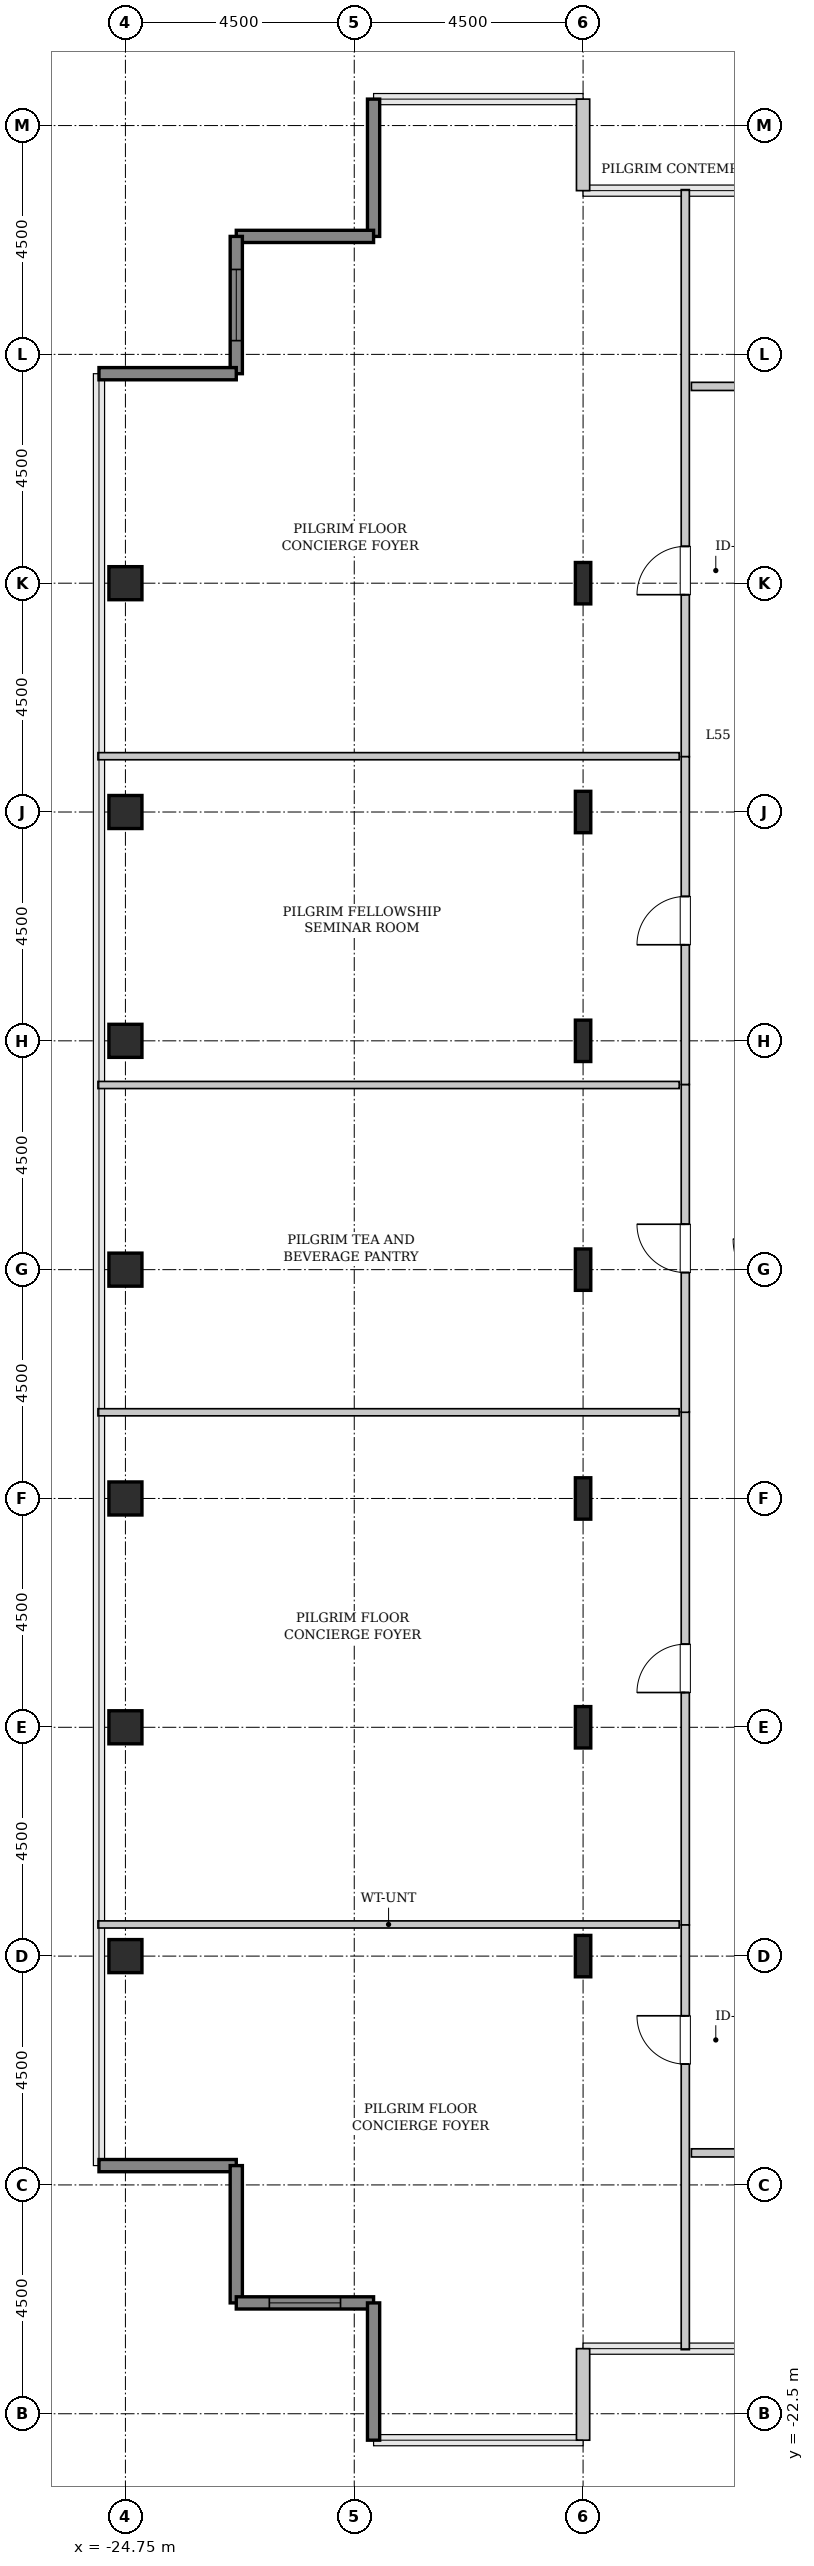
"""IFC4 building model, lengths in metres.
Left out: names, types, materials, properties, quantities, classifications, styles, units other than length and angle.
Written with IfcOpenShell. Run it as: python <this file> out.ifc"""

import sys

from ifc_helpers import new_model, si_unit, direction, frame, frame_2d, origin, origin_2d, place, context, subcontext, project, spatial, rectangle, hollow_rectangle, i_section, extrude, source, transform, mapped, element, fill, save


model = new_model("IFC4")
c1 = context("Model", 3, precision=1e-05, world=origin(), true_north=direction((0.0, 1.0)))
c2 = subcontext(c1, "Body", "Model", "MODEL_VIEW")
j1 = project(units=[si_unit("LENGTHUNIT", "METRE"), si_unit("PLANEANGLEUNIT", "RADIAN")], contexts=[c1])
p1 = place(None, origin())
s1 = spatial("IfcSite", under=j1, at=p1, CompositionType="ELEMENT")
p2 = place(p1, origin())
s2 = spatial("IfcBuilding", under=s1, at=p2, CompositionType="ELEMENT")
p3 = place(p2, frame((0.0, 0.0, 221.8)))
s3 = spatial("IfcBuildingStorey", under=s2, at=p3, CompositionType="ELEMENT", Elevation=221.8)
m1 = source(origin(), c2, "Body", "SweptSolid", [
    extrude(hollow_rectangle(XDim=0.65, YDim=0.65, WallThickness=0.032, InnerFilletRadius=0.032, OuterFilletRadius=0.064, at=origin_2d()), origin(), (0.0, 0.0, 1.0), 3.8),
])
for number, where, z_axis, x_axis in (
    (1, (-24.75, -13.5, 0.0), (0.0, 0.0, 1.0), (1.0, 0.0, 0.0)),
    (2, (-24.75, -9.0, 0.0), (0.0, 0.0, 1.0), (1.0, 0.0, 0.0)),
    (3, (-24.75, -4.5, 0.0), (0.0, 0.0, 1.0), (1.0, 0.0, 0.0)),
    (4, (-24.75, 0.0, 0.0), (0.0, 0.0, 1.0), (1.0, 0.0, 0.0)),
    (5, (-24.75, 4.5, 0.0), (0.0, 0.0, 1.0), (1.0, 0.0, 0.0)),
    (6, (-24.75, 9.0, 0.0), (0.0, 0.0, 1.0), (1.0, 0.0, 0.0)),
    (7, (-24.75, 13.5, 0.0), (0.0, 0.0, 1.0), (1.0, 0.0, 0.0)),
):
    element("IfcColumn", number, at=place(p3, frame(where, z_axis=z_axis, x_axis=x_axis)), inside=s3, PredefinedType="COLUMN", context=c2, shape_type="MappedRepresentation", body=[
        mapped(m1, transform((0.0, 0.0, 0.0), x_axis=(1.0, 0.0, 0.0), y_axis=(0.0, 1.0, 0.0), z_axis=(0.0, 0.0, 1.0), scale=1.0)),
    ])
m2 = source(origin(), c2, "Body", "SweptSolid", [
    extrude(i_section(OverallWidth=0.303, OverallDepth=0.814, WebThickness=0.021, FlangeThickness=0.04, FilletRadius=0.03, at=origin_2d()), origin(), (0.0, 0.0, 1.0), 3.8),
])
for number, where, z_axis, x_axis in (
    (8, (-15.75, -13.5, 0.0), (0.0, 0.0, 1.0), (1.0, 0.0, 0.0)),
    (9, (-15.75, -9.0, 0.0), (0.0, 0.0, 1.0), (1.0, 0.0, 0.0)),
    (10, (-15.75, -4.5, 0.0), (0.0, 0.0, 1.0), (1.0, 0.0, 0.0)),
    (11, (-15.75, 0.0, 0.0), (0.0, 0.0, 1.0), (1.0, 0.0, 0.0)),
    (12, (-15.75, 4.5, 0.0), (0.0, 0.0, 1.0), (1.0, 0.0, 0.0)),
    (13, (-15.75, 9.0, 0.0), (0.0, 0.0, 1.0), (1.0, 0.0, 0.0)),
    (14, (-15.75, 13.5, 0.0), (0.0, 0.0, 1.0), (1.0, 0.0, 0.0)),
):
    element("IfcColumn", number, at=place(p3, frame(where, z_axis=z_axis, x_axis=x_axis)), inside=s3, PredefinedType="COLUMN", context=c2, shape_type="MappedRepresentation", body=[
        mapped(m2, transform((0.0, 0.0, 0.0), x_axis=(1.0, 0.0, 0.0), y_axis=(0.0, 1.0, 0.0), z_axis=(0.0, 0.0, 1.0), scale=1.0)),
    ])
m3 = source(origin(), c2, "Body", "SweptSolid", [
    extrude(rectangle(XDim=1.8, YDim=0.26, at=frame_2d((0.9, 0.0))), origin(), (0.0, 0.0, 1.0), 3.55),
])
p4 = place(p3, frame((-15.75, 21.22, 0.0), z_axis=(0.0, 0.0, 1.0), x_axis=(0.0, 1.0, 0.0)))
e15 = element("IfcWall", 15, at=p4, inside=s3, PredefinedType="SOLIDWALL", context=c2, shape_type="MappedRepresentation", body=[
    mapped(m3, transform((0.0, 0.0, 0.0), x_axis=(1.0, 0.0, 0.0), y_axis=(0.0, 1.0, 0.0), z_axis=(0.0, 0.0, 1.0), scale=1.0)),
])
m4 = source(origin(), c2, "Body", "SweptSolid", [
    extrude(rectangle(XDim=2.7, YDim=0.24, at=frame_2d((1.35, 0.0))), origin(), (0.0, 0.0, 1.0), 3.55),
])
for number, where, z_axis, x_axis in (
    (16, (-19.87, 23.02, 0.0), (0.0, 0.0, 1.0), (0.0, -1.0, 0.0)),
    (17, (-19.87, 20.32, 0.0), (0.0, 0.0, 1.0), (-1.0, 0.0, 0.0)),
):
    element("IfcWall", number, at=place(p3, frame(where, z_axis=z_axis, x_axis=x_axis)), inside=s3, PredefinedType="SHEAR", context=c2, shape_type="MappedRepresentation", body=[
        mapped(m4, transform((0.0, 0.0, 0.0), x_axis=(1.0, 0.0, 0.0), y_axis=(0.0, 1.0, 0.0), z_axis=(0.0, 0.0, 1.0), scale=1.0)),
    ])
p5 = place(p3, frame((-22.57, 20.32, 0.0), z_axis=(0.0, 0.0, 1.0), x_axis=(0.0, -1.0, 0.0)))
e18 = element("IfcWall", 18, at=p5, inside=s3, PredefinedType="SHEAR", context=c2, shape_type="MappedRepresentation", body=[
    mapped(m4, transform((0.0, 0.0, 0.0), x_axis=(1.0, 0.0, 0.0), y_axis=(0.0, 1.0, 0.0), z_axis=(0.0, 0.0, 1.0), scale=1.0)),
])
p6 = place(p5, frame((0.65, 0.0, 0.85)))
e19 = element("IfcOpeningElement", 19, at=p6, cuts=e18, PredefinedType="OPENING", context=c2, shape_type="SweptSolid", body=[
    extrude(rectangle(XDim=1.4, YDim=1.8, at=frame_2d((0.7, 0.9))), frame((0.0, 0.13, 0.0), z_axis=(0.0, -1.0, 0.0), x_axis=(1.0, 0.0, 0.0)), (0.0, 0.0, 1.0), 0.26),
])
for number, where, z_axis, x_axis in (
    (20, (-22.57, 17.62, 0.0), (0.0, 0.0, 1.0), (-1.0, 0.0, 0.0)),
    (21, (-25.27, -17.62, 0.0), (0.0, 0.0, 1.0), (1.0, 0.0, 0.0)),
    (22, (-22.57, -17.62, 0.0), (0.0, 0.0, 1.0), (0.0, -1.0, 0.0)),
):
    element("IfcWall", number, at=place(p3, frame(where, z_axis=z_axis, x_axis=x_axis)), inside=s3, PredefinedType="SHEAR", context=c2, shape_type="MappedRepresentation", body=[
        mapped(m4, transform((0.0, 0.0, 0.0), x_axis=(1.0, 0.0, 0.0), y_axis=(0.0, 1.0, 0.0), z_axis=(0.0, 0.0, 1.0), scale=1.0)),
    ])
p7 = place(p3, frame((-22.57, -20.32, 0.0), z_axis=(0.0, 0.0, 1.0), x_axis=(1.0, 0.0, 0.0)))
e23 = element("IfcWall", 23, at=p7, inside=s3, PredefinedType="SHEAR", context=c2, shape_type="MappedRepresentation", body=[
    mapped(m4, transform((0.0, 0.0, 0.0), x_axis=(1.0, 0.0, 0.0), y_axis=(0.0, 1.0, 0.0), z_axis=(0.0, 0.0, 1.0), scale=1.0)),
])
p8 = place(p7, frame((0.65, 0.0, 0.85)))
e24 = element("IfcOpeningElement", 24, at=p8, cuts=e23, PredefinedType="OPENING", context=c2, shape_type="SweptSolid", body=[
    extrude(rectangle(XDim=1.4, YDim=1.8, at=frame_2d((0.7, 0.9))), frame((0.0, 0.13, 0.0), z_axis=(0.0, -1.0, 0.0), x_axis=(1.0, 0.0, 0.0)), (0.0, 0.0, 1.0), 0.26),
])
p9 = place(p3, frame((-19.87, -20.32, 0.0), z_axis=(0.0, 0.0, 1.0), x_axis=(0.0, -1.0, 0.0)))
e25 = element("IfcWall", 25, at=p9, inside=s3, PredefinedType="SHEAR", context=c2, shape_type="MappedRepresentation", body=[
    mapped(m4, transform((0.0, 0.0, 0.0), x_axis=(1.0, 0.0, 0.0), y_axis=(0.0, 1.0, 0.0), z_axis=(0.0, 0.0, 1.0), scale=1.0)),
])
p10 = place(p3, frame((-15.75, -23.02, 0.0), z_axis=(0.0, 0.0, 1.0), x_axis=(0.0, 1.0, 0.0)))
e26 = element("IfcWall", 26, at=p10, inside=s3, PredefinedType="SOLIDWALL", context=c2, shape_type="MappedRepresentation", body=[
    mapped(m3, transform((0.0, 0.0, 0.0), x_axis=(1.0, 0.0, 0.0), y_axis=(0.0, 1.0, 0.0), z_axis=(0.0, 0.0, 1.0), scale=1.0)),
])
m5 = source(origin(), c2, "Body", "SweptSolid", [
    extrude(rectangle(XDim=10.093, YDim=0.16, at=frame_2d((5.046, 0.0))), origin(), (0.0, 0.0, 1.0), 3.535),
])
p11 = place(p3, frame((-13.74, -12.887, 0.0), z_axis=(0.0, 0.0, 1.0), x_axis=(0.0, 1.0, 0.0)))
e27 = element("IfcWall", 27, at=p11, inside=s3, PredefinedType="PARTITIONING", context=c2, shape_type="MappedRepresentation", body=[
    mapped(m5, transform((0.0, 0.0, 0.0), x_axis=(1.0, 0.0, 0.0), y_axis=(0.0, 1.0, 0.0), z_axis=(0.0, 0.0, 1.0), scale=1.0)),
])
p12 = place(p11, frame((4.571, 0.0, 0.0)))
e28 = element("IfcOpeningElement", 28, at=p12, cuts=e27, PredefinedType="OPENING", context=c2, shape_type="SweptSolid", body=[
    extrude(rectangle(XDim=0.95, YDim=2.1, at=frame_2d((0.475, 1.05))), frame((0.0, 0.09, 0.0), z_axis=(0.0, -1.0, 0.0), x_axis=(1.0, 0.0, 0.0)), (0.0, 0.0, 1.0), 0.18),
])
m6 = source(origin(), c2, "Body", "SweptSolid", [
    extrude(rectangle(XDim=11.43, YDim=0.14, at=frame_2d((5.715, 0.0))), origin(), (0.0, 0.0, 1.0), 3.535),
])
for number, where, z_axis, x_axis in (
    (29, (-25.29, -12.877, 0.0), (0.0, 0.0, 1.0), (1.0, 0.0, 0.0)),
    (30, (-25.29, -2.805, 0.0), (0.0, 0.0, 1.0), (1.0, 0.0, 0.0)),
):
    element("IfcWall", number, at=place(p3, frame(where, z_axis=z_axis, x_axis=x_axis)), inside=s3, PredefinedType="PARTITIONING", context=c2, shape_type="MappedRepresentation", body=[
        mapped(m6, transform((0.0, 0.0, 0.0), x_axis=(1.0, 0.0, 0.0), y_axis=(0.0, 1.0, 0.0), z_axis=(0.0, 0.0, 1.0), scale=1.0)),
    ])
m7 = source(origin(), c2, "Body", "SweptSolid", [
    extrude(rectangle(XDim=8.353, YDim=0.16, at=frame_2d((4.176, 0.0))), origin(), (0.0, 0.0, 1.0), 3.535),
])
p13 = place(p3, frame((-13.74, -21.24, 0.0), z_axis=(0.0, 0.0, 1.0), x_axis=(0.0, 1.0, 0.0)))
e31 = element("IfcWall", 31, at=p13, inside=s3, PredefinedType="PARTITIONING", context=c2, shape_type="MappedRepresentation", body=[
    mapped(m7, transform((0.0, 0.0, 0.0), x_axis=(1.0, 0.0, 0.0), y_axis=(0.0, 1.0, 0.0), z_axis=(0.0, 0.0, 1.0), scale=1.0)),
])
p14 = place(p13, frame((5.616, 0.0, 0.0)))
e32 = element("IfcOpeningElement", 32, at=p14, cuts=e31, PredefinedType="OPENING", context=c2, shape_type="SweptSolid", body=[
    extrude(rectangle(XDim=0.95, YDim=2.1, at=frame_2d((0.475, 1.05))), frame((0.0, 0.09, 0.0), z_axis=(0.0, -1.0, 0.0), x_axis=(1.0, 0.0, 0.0)), (0.0, 0.0, 1.0), 0.18),
])
m8 = source(origin(), c2, "Body", "SweptSolid", [
    extrude(rectangle(XDim=11.153, YDim=0.16, at=frame_2d((5.576, 0.0))), origin(), (0.0, 0.0, 1.0), 3.535),
])
p15 = place(p3, frame((-13.74, 10.087, 0.0), z_axis=(0.0, 0.0, 1.0), x_axis=(0.0, 1.0, 0.0)))
e33 = element("IfcWall", 33, at=p15, inside=s3, PredefinedType="PARTITIONING", context=c2, shape_type="MappedRepresentation", body=[
    mapped(m8, transform((0.0, 0.0, 0.0), x_axis=(1.0, 0.0, 0.0), y_axis=(0.0, 1.0, 0.0), z_axis=(0.0, 0.0, 1.0), scale=1.0)),
])
p16 = place(p15, frame((3.186, 0.0, 0.0)))
e34 = element("IfcOpeningElement", 34, at=p16, cuts=e33, PredefinedType="OPENING", context=c2, shape_type="SweptSolid", body=[
    extrude(rectangle(XDim=0.95, YDim=2.1, at=frame_2d((0.475, 1.05))), frame((0.0, 0.09, 0.0), z_axis=(0.0, -1.0, 0.0), x_axis=(1.0, 0.0, 0.0)), (0.0, 0.0, 1.0), 0.18),
])
p17 = place(p3, frame((-25.29, 10.097, 0.0), z_axis=(0.0, 0.0, 1.0), x_axis=(1.0, 0.0, 0.0)))
e35 = element("IfcWall", 35, at=p17, inside=s3, PredefinedType="PARTITIONING", context=c2, shape_type="MappedRepresentation", body=[
    mapped(m6, transform((0.0, 0.0, 0.0), x_axis=(1.0, 0.0, 0.0), y_axis=(0.0, 1.0, 0.0), z_axis=(0.0, 0.0, 1.0), scale=1.0)),
])
m9 = source(origin(), c2, "Body", "SweptSolid", [
    extrude(rectangle(XDim=6.446, YDim=0.16, at=frame_2d((3.223, 0.0))), origin(), (0.0, 0.0, 1.0), 3.535),
])
p18 = place(p3, frame((-13.74, -2.805, 0.0), z_axis=(0.0, 0.0, 1.0), x_axis=(0.0, 1.0, 0.0)))
e36 = element("IfcWall", 36, at=p18, inside=s3, PredefinedType="PARTITIONING", context=c2, shape_type="MappedRepresentation", body=[
    mapped(m9, transform((0.0, 0.0, 0.0), x_axis=(1.0, 0.0, 0.0), y_axis=(0.0, 1.0, 0.0), z_axis=(0.0, 0.0, 1.0), scale=1.0)),
])
p19 = place(p18, frame((2.748, 0.0, 0.0)))
e37 = element("IfcOpeningElement", 37, at=p19, cuts=e36, PredefinedType="OPENING", context=c2, shape_type="SweptSolid", body=[
    extrude(rectangle(XDim=0.95, YDim=2.1, at=frame_2d((0.475, 1.05))), frame((0.0, 0.09, 0.0), z_axis=(0.0, -1.0, 0.0), x_axis=(1.0, 0.0, 0.0)), (0.0, 0.0, 1.0), 0.18),
])
p20 = place(p3, frame((-25.29, 3.631, 0.0), z_axis=(0.0, 0.0, 1.0), x_axis=(1.0, 0.0, 0.0)))
e38 = element("IfcWall", 38, at=p20, inside=s3, PredefinedType="PARTITIONING", context=c2, shape_type="MappedRepresentation", body=[
    mapped(m6, transform((0.0, 0.0, 0.0), x_axis=(1.0, 0.0, 0.0), y_axis=(0.0, 1.0, 0.0), z_axis=(0.0, 0.0, 1.0), scale=1.0)),
])
m10 = source(origin(), c2, "Body", "SweptSolid", [
    extrude(rectangle(XDim=6.446, YDim=0.16, at=frame_2d((3.223, 0.0))), origin(), (0.0, 0.0, 1.0), 3.535),
])
p21 = place(p3, frame((-13.74, 3.641, 0.0), z_axis=(0.0, 0.0, 1.0), x_axis=(0.0, 1.0, 0.0)))
e39 = element("IfcWall", 39, at=p21, inside=s3, PredefinedType="PARTITIONING", context=c2, shape_type="MappedRepresentation", body=[
    mapped(m10, transform((0.0, 0.0, 0.0), x_axis=(1.0, 0.0, 0.0), y_axis=(0.0, 1.0, 0.0), z_axis=(0.0, 0.0, 1.0), scale=1.0)),
])
p22 = place(p21, frame((2.748, 0.0, 0.0)))
e40 = element("IfcOpeningElement", 40, at=p22, cuts=e39, PredefinedType="OPENING", context=c2, shape_type="SweptSolid", body=[
    extrude(rectangle(XDim=0.95, YDim=2.1, at=frame_2d((0.475, 1.05))), frame((0.0, 0.09, 0.0), z_axis=(0.0, -1.0, 0.0), x_axis=(1.0, 0.0, 0.0)), (0.0, 0.0, 1.0), 0.18),
])
m11 = source(origin(), c2, "Body", "SweptSolid", [
    extrude(rectangle(XDim=4.16, YDim=0.16, at=frame_2d((2.08, 0.0))), origin(), (0.0, 0.0, 1.0), 3.535),
])
p23 = place(p3, frame((-13.62, 17.37, 0.0), z_axis=(0.0, 0.0, 1.0), x_axis=(1.0, 0.0, 0.0)))
e41 = element("IfcWall", 41, at=p23, inside=s3, PredefinedType="PARTITIONING", context=c2, shape_type="MappedRepresentation", body=[
    mapped(m11, transform((0.0, 0.0, 0.0), x_axis=(1.0, 0.0, 0.0), y_axis=(0.0, 1.0, 0.0), z_axis=(0.0, 0.0, 1.0), scale=1.0)),
])
p24 = place(p23, frame((0.969, 0.0, 0.0)))
e42 = element("IfcOpeningElement", 42, at=p24, cuts=e41, PredefinedType="OPENING", context=c2, shape_type="SweptSolid", body=[
    extrude(rectangle(XDim=0.95, YDim=2.1, at=frame_2d((0.475, 1.05))), frame((0.0, 0.09, 0.0), z_axis=(0.0, -1.0, 0.0), x_axis=(1.0, 0.0, 0.0)), (0.0, 0.0, 1.0), 0.18),
])
m12 = source(origin(), c2, "Body", "SweptSolid", [
    extrude(rectangle(XDim=11.025, YDim=0.16, at=frame_2d((5.513, 0.0))), origin(), (0.0, 0.0, 1.0), 3.535),
])
p25 = place(p3, frame((-13.62, -17.37, 0.0), z_axis=(0.0, 0.0, 1.0), x_axis=(1.0, 0.0, 0.0)))
e43 = element("IfcWall", 43, at=p25, inside=s3, PredefinedType="PARTITIONING", context=c2, shape_type="MappedRepresentation", body=[
    mapped(m12, transform((0.0, 0.0, 0.0), x_axis=(1.0, 0.0, 0.0), y_axis=(0.0, 1.0, 0.0), z_axis=(0.0, 0.0, 1.0), scale=1.0)),
])
p26 = place(p25, frame((5.038, 0.0, 0.0)))
e44 = element("IfcOpeningElement", 44, at=p26, cuts=e43, PredefinedType="OPENING", context=c2, shape_type="SweptSolid", body=[
    extrude(rectangle(XDim=0.95, YDim=2.1, at=frame_2d((0.475, 1.05))), frame((0.0, 0.09, 0.0), z_axis=(0.0, -1.0, 0.0), x_axis=(1.0, 0.0, 0.0)), (0.0, 0.0, 1.0), 0.18),
])
m13 = source(origin(), c2, "Body", "SweptSolid", [
    extrude(rectangle(XDim=1.4, YDim=1.8, at=frame_2d((0.7, 0.9))), frame((0.0, 0.03, 0.0), z_axis=(0.0, -1.0, 0.0), x_axis=(1.0, 0.0, 0.0)), (0.0, 0.0, 1.0), 0.06),
])
p27 = place(p6, origin())
e45 = element("IfcWindow", 45, at=p27, inside=s3, PartitioningType="SINGLE_PANEL", PredefinedType="WINDOW", context=c2, shape_type="MappedRepresentation", body=[
    mapped(m13, transform((0.0, 0.0, 0.0), x_axis=(1.0, 0.0, 0.0), y_axis=(0.0, 1.0, 0.0), z_axis=(0.0, 0.0, 1.0), scale=1.0)),
])
fill(e19, e45)
p28 = place(p8, origin())
e46 = element("IfcWindow", 46, at=p28, inside=s3, PartitioningType="SINGLE_PANEL", PredefinedType="WINDOW", context=c2, shape_type="MappedRepresentation", body=[
    mapped(m13, transform((0.0, 0.0, 0.0), x_axis=(1.0, 0.0, 0.0), y_axis=(0.0, 1.0, 0.0), z_axis=(0.0, 0.0, 1.0), scale=1.0)),
])
fill(e24, e46)
m14 = source(origin(), c2, "Body", "SweptSolid", [
    extrude(rectangle(XDim=0.95, YDim=2.1, at=frame_2d((0.475, 1.05))), frame((0.0, 0.025, 0.0), z_axis=(0.0, -1.0, 0.0), x_axis=(1.0, 0.0, 0.0)), (0.0, 0.0, 1.0), 0.05),
])
p29 = place(p12, origin())
e47 = element("IfcDoor", 47, at=p29, inside=s3, OperationType="SINGLE_SWING_LEFT", PredefinedType="DOOR", context=c2, shape_type="MappedRepresentation", body=[
    mapped(m14, transform((0.0, 0.0, 0.0), x_axis=(1.0, 0.0, 0.0), y_axis=(0.0, 1.0, 0.0), z_axis=(0.0, 0.0, 1.0), scale=1.0)),
])
fill(e28, e47)
p30 = place(p14, origin())
e48 = element("IfcDoor", 48, at=p30, inside=s3, OperationType="SINGLE_SWING_RIGHT", PredefinedType="DOOR", context=c2, shape_type="MappedRepresentation", body=[
    mapped(m14, transform((0.0, 0.0, 0.0), x_axis=(1.0, 0.0, 0.0), y_axis=(0.0, 1.0, 0.0), z_axis=(0.0, 0.0, 1.0), scale=1.0)),
])
fill(e32, e48)
p31 = place(p16, origin())
e49 = element("IfcDoor", 49, at=p31, inside=s3, OperationType="SINGLE_SWING_LEFT", PredefinedType="DOOR", context=c2, shape_type="MappedRepresentation", body=[
    mapped(m14, transform((0.0, 0.0, 0.0), x_axis=(1.0, 0.0, 0.0), y_axis=(0.0, 1.0, 0.0), z_axis=(0.0, 0.0, 1.0), scale=1.0)),
])
fill(e34, e49)
p32 = place(p19, origin())
e50 = element("IfcDoor", 50, at=p32, inside=s3, OperationType="SINGLE_SWING_RIGHT", PredefinedType="DOOR", context=c2, shape_type="MappedRepresentation", body=[
    mapped(m14, transform((0.0, 0.0, 0.0), x_axis=(1.0, 0.0, 0.0), y_axis=(0.0, 1.0, 0.0), z_axis=(0.0, 0.0, 1.0), scale=1.0)),
])
fill(e37, e50)
p33 = place(p22, origin())
e51 = element("IfcDoor", 51, at=p33, inside=s3, OperationType="SINGLE_SWING_LEFT", PredefinedType="DOOR", context=c2, shape_type="MappedRepresentation", body=[
    mapped(m14, transform((0.0, 0.0, 0.0), x_axis=(1.0, 0.0, 0.0), y_axis=(0.0, 1.0, 0.0), z_axis=(0.0, 0.0, 1.0), scale=1.0)),
])
fill(e40, e51)
save(model, sys.argv[1])
